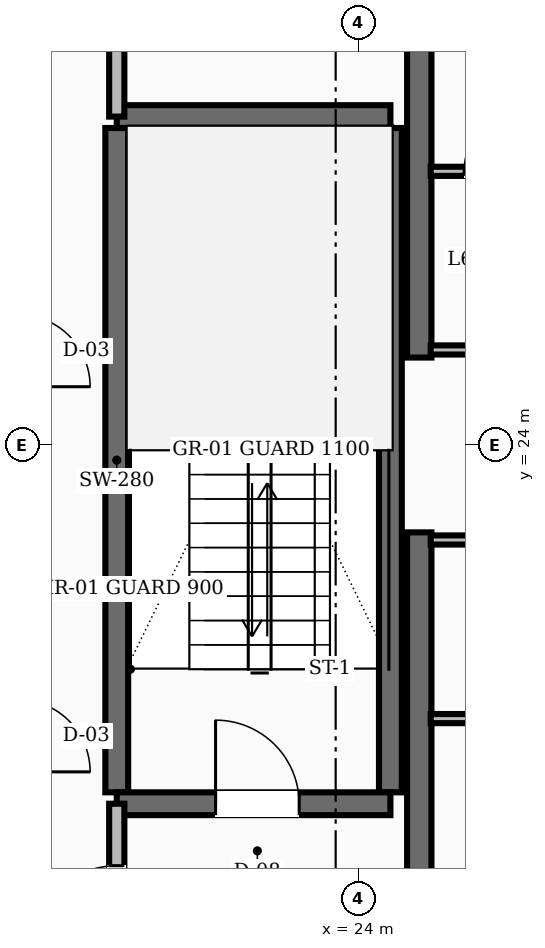
"""IFC4 building model, lengths in metres.
Left out: names, types, materials, properties, quantities, classifications, styles, units other than length and angle.
Written with IfcOpenShell. Run it as: python <this file> out.ifc"""

import sys

from ifc_helpers import new_model, si_unit, direction, frame, frame_2d, origin, place, context, subcontext, project, spatial, rectangle, extrude, element, fill, save


model = new_model("IFC4")
c1 = context("Model", 3, precision=1e-05, world=origin(), true_north=direction((0.0, 1.0)))
c2 = subcontext(c1, "Body", "Model", "MODEL_VIEW")
j1 = project(units=[si_unit("LENGTHUNIT", "METRE"), si_unit("PLANEANGLEUNIT", "RADIAN")], contexts=[c1])
p1 = place(None, origin())
s1 = spatial("IfcSite", under=j1, at=p1, CompositionType="ELEMENT")
p2 = place(p1, origin())
s2 = spatial("IfcBuilding", under=s1, at=p2, CompositionType="ELEMENT")
p3 = place(p2, frame((0.0, 0.0, 250.8)))
s3 = spatial("IfcBuildingStorey", under=s2, at=p3, CompositionType="ELEMENT", Elevation=250.8)
for number, where, z_axis, x_axis in (
    (1, (24.8, 16.55, 0.0), (0.0, 0.0, 1.0), (0.0, 1.0, 0.0)),
    (2, (24.8, 25.15, 0.0), (0.0, 0.0, 1.0), (0.0, 1.0, 0.0)),
):
    element("IfcWall", number, at=place(p3, frame(where, z_axis=z_axis, x_axis=x_axis)), inside=s3, PredefinedType="SHEAR", context=c2, shape_type="SweptSolid", body=[
        extrude(rectangle(XDim=6.3, YDim=0.32, at=frame_2d((3.15, 0.0))), origin(), (0.0, 0.0, 1.0), 3.6),
    ])
for number, where, z_axis, x_axis in (
    (3, (20.82, 19.43, 0.0), (0.0, 0.0, 1.0), (0.0, 1.0, 0.0)),
    (4, (24.42, 19.43, 0.0), (0.0, 0.0, 1.0), (0.0, 1.0, 0.0)),
):
    element("IfcWall", number, at=place(p3, frame(where, z_axis=z_axis, x_axis=x_axis)), inside=s3, PredefinedType="SHEAR", context=c2, shape_type="SweptSolid", body=[
        extrude(rectangle(XDim=8.74, YDim=0.3, at=frame_2d((4.37, 0.0))), origin(), (0.0, 0.0, 1.0), 3.6),
    ])
p4 = place(p3, frame((20.82, 19.28, 0.0), z_axis=(0.0, 0.0, 1.0), x_axis=(1.0, 0.0, 0.0)))
e5 = element("IfcWall", 5, at=p4, inside=s3, PredefinedType="SHEAR", context=c2, shape_type="SweptSolid", body=[
    extrude(rectangle(XDim=3.6, YDim=0.3, at=frame_2d((1.8, 0.0))), origin(), (0.0, 0.0, 1.0), 3.6),
])
p5 = place(p4, frame((1.3, 0.0, 0.0)))
e6 = element("IfcOpeningElement", 6, at=p5, cuts=e5, PredefinedType="OPENING", context=c2, shape_type="SweptSolid", body=[
    extrude(rectangle(XDim=1.1, YDim=2.1, at=frame_2d((0.55, 1.05))), frame((0.0, 0.16, 0.0), z_axis=(0.0, -1.0, 0.0), x_axis=(1.0, 0.0, 0.0)), (0.0, 0.0, 1.0), 0.32),
])
p6 = place(p3, frame((20.82, 28.32, 0.0), z_axis=(0.0, 0.0, 1.0), x_axis=(1.0, 0.0, 0.0)))
e7 = element("IfcWall", 7, at=p6, inside=s3, PredefinedType="SHEAR", context=c2, shape_type="SweptSolid", body=[
    extrude(rectangle(XDim=3.6, YDim=0.3, at=frame_2d((1.8, 0.0))), origin(), (0.0, 0.0, 1.0), 3.6),
])
p7 = place(p3, frame((20.82, 16.55, 0.0), z_axis=(0.0, 0.0, 1.0), x_axis=(0.0, 1.0, 0.0)))
e8 = element("IfcWall", 8, at=p7, inside=s3, PredefinedType="SOLIDWALL", context=c2, shape_type="SweptSolid", body=[
    extrude(rectangle(XDim=2.73, YDim=0.2, at=frame_2d((1.365, 0.0))), origin(), (0.0, 0.0, 1.0), 2.87),
])
p8 = place(p7, frame((0.815, 0.0, 0.0)))
e9 = element("IfcOpeningElement", 9, at=p8, cuts=e8, PredefinedType="OPENING", context=c2, shape_type="SweptSolid", body=[
    extrude(rectangle(XDim=1.1, YDim=2.1, at=frame_2d((0.55, 1.05))), frame((0.0, 0.11, 0.0), z_axis=(0.0, -1.0, 0.0), x_axis=(1.0, 0.0, 0.0)), (0.0, 0.0, 1.0), 0.22),
])
p9 = place(p3, frame((20.82, 28.32, 0.0), z_axis=(0.0, 0.0, 1.0), x_axis=(0.0, 1.0, 0.0)))
e10 = element("IfcWall", 10, at=p9, inside=s3, PredefinedType="SOLIDWALL", context=c2, shape_type="SweptSolid", body=[
    extrude(rectangle(XDim=3.13, YDim=0.2, at=frame_2d((1.565, 0.0))), origin(), (0.0, 0.0, 1.0), 2.87),
])
p10 = place(p9, frame((1.09, 0.0, 0.0)))
e11 = element("IfcOpeningElement", 11, at=p10, cuts=e10, PredefinedType="OPENING", context=c2, shape_type="SweptSolid", body=[
    extrude(rectangle(XDim=0.95, YDim=2.1, at=frame_2d((0.475, 1.05))), frame((0.0, 0.11, 0.0), z_axis=(0.0, -1.0, 0.0), x_axis=(1.0, 0.0, 0.0)), (0.0, 0.0, 1.0), 0.22),
])
p11 = place(p3, frame((24.95, 25.25, 0.0), z_axis=(0.0, 0.0, 1.0), x_axis=(1.0, 0.0, 0.0)))
e12 = element("IfcWall", 12, at=p11, inside=s3, PredefinedType="PARTITIONING", context=c2, shape_type="SweptSolid", body=[
    extrude(rectangle(XDim=3.2, YDim=0.12, at=frame_2d((1.6, 0.0))), origin(), (0.0, 0.0, 1.0), 2.87),
])
p12 = place(p11, frame((1.125, 0.0, 0.0)))
e13 = element("IfcOpeningElement", 13, at=p12, cuts=e12, PredefinedType="OPENING", context=c2, shape_type="SweptSolid", body=[
    extrude(rectangle(XDim=0.95, YDim=2.1, at=frame_2d((0.475, 1.05))), frame((0.0, 0.07, 0.0), z_axis=(0.0, -1.0, 0.0), x_axis=(1.0, 0.0, 0.0)), (0.0, 0.0, 1.0), 0.14),
])
p13 = place(p3, frame((24.95, 22.75, 0.0), z_axis=(0.0, 0.0, 1.0), x_axis=(1.0, 0.0, 0.0)))
e14 = element("IfcWall", 14, at=p13, inside=s3, PredefinedType="PARTITIONING", context=c2, shape_type="SweptSolid", body=[
    extrude(rectangle(XDim=3.2, YDim=0.12, at=frame_2d((1.6, 0.0))), origin(), (0.0, 0.0, 1.0), 2.87),
])
p14 = place(p13, frame((1.125, 0.0, 0.0)))
e15 = element("IfcOpeningElement", 15, at=p14, cuts=e14, PredefinedType="OPENING", context=c2, shape_type="SweptSolid", body=[
    extrude(rectangle(XDim=0.95, YDim=2.1, at=frame_2d((0.475, 1.05))), frame((0.0, 0.07, 0.0), z_axis=(0.0, -1.0, 0.0), x_axis=(1.0, 0.0, 0.0)), (0.0, 0.0, 1.0), 0.14),
])
p15 = place(p3, frame((24.95, 27.6, 0.0), z_axis=(0.0, 0.0, 1.0), x_axis=(1.0, 0.0, 0.0)))
e16 = element("IfcWall", 16, at=p15, inside=s3, PredefinedType="PARTITIONING", context=c2, shape_type="SweptSolid", body=[
    extrude(rectangle(XDim=3.2, YDim=0.12, at=frame_2d((1.6, 0.0))), origin(), (0.0, 0.0, 1.0), 2.87),
])
p16 = place(p15, frame((0.44, 0.0, 0.0)))
e17 = element("IfcOpeningElement", 17, at=p16, cuts=e16, PredefinedType="OPENING", context=c2, shape_type="SweptSolid", body=[
    extrude(rectangle(XDim=0.86, YDim=2.1, at=frame_2d((0.43, 1.05))), frame((0.0, 0.07, 0.0), z_axis=(0.0, -1.0, 0.0), x_axis=(1.0, 0.0, 0.0)), (0.0, 0.0, 1.0), 0.14),
])
p17 = place(p15, frame((1.9, 0.0, 0.0)))
e18 = element("IfcOpeningElement", 18, at=p17, cuts=e16, PredefinedType="OPENING", context=c2, shape_type="SweptSolid", body=[
    extrude(rectangle(XDim=0.86, YDim=2.1, at=frame_2d((0.43, 1.05))), frame((0.0, 0.07, 0.0), z_axis=(0.0, -1.0, 0.0), x_axis=(1.0, 0.0, 0.0)), (0.0, 0.0, 1.0), 0.14),
])
p18 = place(p3, frame((24.95, 20.4, 0.0), z_axis=(0.0, 0.0, 1.0), x_axis=(1.0, 0.0, 0.0)))
e19 = element("IfcWall", 19, at=p18, inside=s3, PredefinedType="PARTITIONING", context=c2, shape_type="SweptSolid", body=[
    extrude(rectangle(XDim=3.2, YDim=0.12, at=frame_2d((1.6, 0.0))), origin(), (0.0, 0.0, 1.0), 2.87),
])
p19 = place(p18, frame((1.125, 0.0, 0.0)))
e20 = element("IfcOpeningElement", 20, at=p19, cuts=e19, PredefinedType="OPENING", context=c2, shape_type="SweptSolid", body=[
    extrude(rectangle(XDim=0.95, YDim=2.1, at=frame_2d((0.475, 1.05))), frame((0.0, 0.07, 0.0), z_axis=(0.0, -1.0, 0.0), x_axis=(1.0, 0.0, 0.0)), (0.0, 0.0, 1.0), 0.14),
])
p20 = place(p5, origin())
e21 = element("IfcDoor", 21, at=p20, inside=s3, OperationType="SINGLE_SWING_LEFT", PredefinedType="DOOR", context=c2, shape_type="SweptSolid", body=[
    extrude(rectangle(XDim=1.1, YDim=2.1, at=frame_2d((0.55, 1.05))), frame((0.0, 0.025, 0.0), z_axis=(0.0, -1.0, 0.0), x_axis=(1.0, 0.0, 0.0)), (0.0, 0.0, 1.0), 0.05),
])
fill(e6, e21)
p21 = place(p8, origin())
e22 = element("IfcDoor", 22, at=p21, inside=s3, OperationType="SINGLE_SWING_LEFT", PredefinedType="DOOR", context=c2, shape_type="SweptSolid", body=[
    extrude(rectangle(XDim=1.1, YDim=2.1, at=frame_2d((0.55, 1.05))), frame((0.0, 0.025, 0.0), z_axis=(0.0, -1.0, 0.0), x_axis=(1.0, 0.0, 0.0)), (0.0, 0.0, 1.0), 0.05),
])
fill(e9, e22)
p22 = place(p16, origin())
e23 = element("IfcDoor", 23, at=p22, inside=s3, OperationType="SINGLE_SWING_RIGHT", PredefinedType="DOOR", context=c2, shape_type="SweptSolid", body=[
    extrude(rectangle(XDim=0.86, YDim=2.1, at=frame_2d((0.43, 1.05))), frame((0.0, 0.025, 0.0), z_axis=(0.0, -1.0, 0.0), x_axis=(1.0, 0.0, 0.0)), (0.0, 0.0, 1.0), 0.05),
])
fill(e17, e23)
save(model, sys.argv[1])
